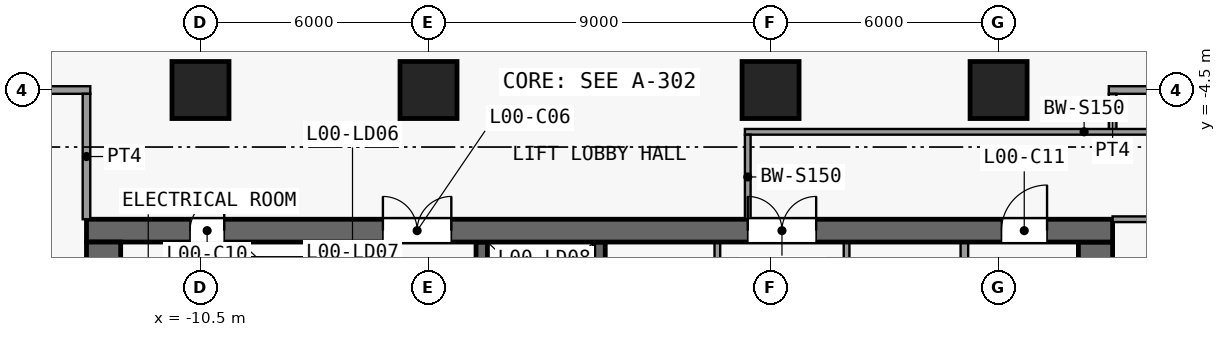
"""IFC4 building model, lengths in metres.
Left out: names, types, materials, properties, quantities, classifications, styles, units other than length and angle.
Written with IfcOpenShell. Run it as: python <this file> out.ifc"""

import sys

from ifc_helpers import new_model, si_unit, direction, frame, frame_2d, origin, origin_2d, place, context, subcontext, project, spatial, rectangle, extrude, element, fill, save


model = new_model("IFC4")
c1 = context("Model", 3, precision=1e-05, world=origin(), true_north=direction((0.0, 1.0)))
c2 = subcontext(c1, "Body", "Model", "MODEL_VIEW")
j1 = project(units=[si_unit("LENGTHUNIT", "METRE"), si_unit("PLANEANGLEUNIT", "RADIAN")], contexts=[c1])
p1 = place(None, origin())
s1 = spatial("IfcSite", under=j1, at=p1, CompositionType="ELEMENT")
p2 = place(p1, origin())
s2 = spatial("IfcBuilding", under=s1, at=p2, CompositionType="ELEMENT")
p3 = place(p2, origin())
s3 = spatial("IfcBuildingStorey", under=s2, at=p3, CompositionType="ELEMENT", Elevation=0.0)
for number, where, z_axis, x_axis in (
    (1, (-10.5, -4.5, 0.0), (0.0, 0.0, 1.0), (1.0, 0.0, 0.0)),
    (2, (-4.5, -4.5, 0.0), (0.0, 0.0, 1.0), (1.0, 0.0, 0.0)),
    (3, (4.5, -4.5, 0.0), (0.0, 0.0, 1.0), (1.0, 0.0, 0.0)),
    (4, (10.5, -4.5, 0.0), (0.0, 0.0, 1.0), (1.0, 0.0, 0.0)),
):
    element("IfcColumn", number, at=place(p3, frame(where, z_axis=z_axis, x_axis=x_axis)), inside=s3, PredefinedType="COLUMN", context=c2, shape_type="SweptSolid", body=[
        extrude(rectangle(XDim=1.5, YDim=1.5, at=origin_2d()), origin(), (0.0, 0.0, 1.0), 8.0),
    ])
p4 = place(p3, frame((-13.5, -8.2, 0.0), z_axis=(0.0, 0.0, 1.0), x_axis=(1.0, 0.0, 0.0)))
e5 = element("IfcWall", 5, at=p4, inside=s3, PredefinedType="SHEAR", context=c2, shape_type="SweptSolid", body=[
    extrude(rectangle(XDim=27.0, YDim=0.6, at=frame_2d((13.5, 0.0))), origin(), (0.0, 0.0, 1.0), 7.65),
])
p5 = place(p4, frame((7.8, 0.0, 0.0)))
e6 = element("IfcOpeningElement", 6, at=p5, cuts=e5, PredefinedType="OPENING", context=c2, shape_type="SweptSolid", body=[
    extrude(rectangle(XDim=1.8, YDim=2.1, at=frame_2d((0.9, 1.05))), frame((0.0, 0.31, 0.0), z_axis=(0.0, -1.0, 0.0), x_axis=(1.0, 0.0, 0.0)), (0.0, 0.0, 1.0), 0.62),
])
p6 = place(p4, frame((17.4, 0.0, 0.0)))
e7 = element("IfcOpeningElement", 7, at=p6, cuts=e5, PredefinedType="OPENING", context=c2, shape_type="SweptSolid", body=[
    extrude(rectangle(XDim=1.8, YDim=2.1, at=frame_2d((0.9, 1.05))), frame((0.0, 0.31, 0.0), z_axis=(0.0, -1.0, 0.0), x_axis=(1.0, 0.0, 0.0)), (0.0, 0.0, 1.0), 0.62),
])
p7 = place(p4, frame((2.725, 0.0, 0.0)))
e8 = element("IfcOpeningElement", 8, at=p7, cuts=e5, PredefinedType="OPENING", context=c2, shape_type="SweptSolid", body=[
    extrude(rectangle(XDim=0.9, YDim=2.1, at=frame_2d((0.45, 1.05))), frame((0.0, 0.31, 0.0), z_axis=(0.0, -1.0, 0.0), x_axis=(1.0, 0.0, 0.0)), (0.0, 0.0, 1.0), 0.62),
])
p8 = place(p4, frame((24.075, 0.0, 0.0)))
e9 = element("IfcOpeningElement", 9, at=p8, cuts=e5, PredefinedType="OPENING", context=c2, shape_type="SweptSolid", body=[
    extrude(rectangle(XDim=1.2, YDim=2.1, at=frame_2d((0.6, 1.05))), frame((0.0, 0.31, 0.0), z_axis=(0.0, -1.0, 0.0), x_axis=(1.0, 0.0, 0.0)), (0.0, 0.0, 1.0), 0.62),
])
p9 = place(p3, frame((-13.05, -8.5, 0.0), z_axis=(0.0, 0.0, 1.0), x_axis=(0.0, -1.0, 0.0)))
e10 = element("IfcWall", 10, at=p9, inside=s3, PredefinedType="SHEAR", context=c2, shape_type="SweptSolid", body=[
    extrude(rectangle(XDim=16.1, YDim=0.9, at=frame_2d((8.05, 0.0))), origin(), (0.0, 0.0, 1.0), 7.65),
])
p10 = place(p9, frame((14.8, 0.0, 0.0)))
e11 = element("IfcOpeningElement", 11, at=p10, cuts=e10, PredefinedType="OPENING", context=c2, shape_type="SweptSolid", body=[
    extrude(rectangle(XDim=1.1, YDim=2.1, at=frame_2d((0.55, 1.05))), frame((0.0, 0.46, 0.0), z_axis=(0.0, -1.0, 0.0), x_axis=(1.0, 0.0, 0.0)), (0.0, 0.0, 1.0), 0.92),
])
p11 = place(p3, frame((13.05, -24.6, 0.0), z_axis=(0.0, 0.0, 1.0), x_axis=(0.0, 1.0, 0.0)))
e12 = element("IfcWall", 12, at=p11, inside=s3, PredefinedType="SHEAR", context=c2, shape_type="SweptSolid", body=[
    extrude(rectangle(XDim=16.1, YDim=0.9, at=frame_2d((8.05, 0.0))), origin(), (0.0, 0.0, 1.0), 7.65),
])
p12 = place(p3, frame((-11.05, -12.1, 0.0), z_axis=(0.0, 0.0, 1.0), x_axis=(0.0, 1.0, 0.0)))
e13 = element("IfcWall", 13, at=p12, inside=s3, PredefinedType="PARTITIONING", context=c2, shape_type="SweptSolid", body=[
    extrude(rectangle(XDim=3.6, YDim=0.2, at=frame_2d((1.8, 0.0))), origin(), (0.0, 0.0, 1.0), 7.65),
])
p13 = place(p12, frame((1.4, 0.0, 0.0)))
e14 = element("IfcOpeningElement", 14, at=p13, cuts=e13, PredefinedType="OPENING", context=c2, shape_type="SweptSolid", body=[
    extrude(rectangle(XDim=0.9, YDim=2.1, at=frame_2d((0.45, 1.05))), frame((0.0, 0.11, 0.0), z_axis=(0.0, -1.0, 0.0), x_axis=(1.0, 0.0, 0.0)), (0.0, 0.0, 1.0), 0.22),
])
p14 = place(p3, frame((-9.6, -17.2, 0.0), z_axis=(0.0, 0.0, 1.0), x_axis=(0.0, 1.0, 0.0)))
e15 = element("IfcWall", 15, at=p14, inside=s3, PredefinedType="SHEAR", context=c2, shape_type="SweptSolid", body=[
    extrude(rectangle(XDim=8.7, YDim=0.3, at=frame_2d((4.35, 0.0))), origin(), (0.0, 0.0, 1.0), 7.65),
])
p15 = place(p3, frame((-6.5, -22.5, 0.0), z_axis=(0.0, 0.0, 1.0), x_axis=(0.0, 1.0, 0.0)))
e16 = element("IfcWall", 16, at=p15, inside=s3, PredefinedType="SHEAR", context=c2, shape_type="SweptSolid", body=[
    extrude(rectangle(XDim=14.0, YDim=0.3, at=frame_2d((7.0, 0.0))), origin(), (0.0, 0.0, 1.0), 7.65),
])
p16 = place(p15, frame((0.94, 0.0, 0.0)))
e17 = element("IfcOpeningElement", 17, at=p16, cuts=e16, PredefinedType="OPENING", context=c2, shape_type="SweptSolid", body=[
    extrude(rectangle(XDim=1.1, YDim=2.1, at=frame_2d((0.55, 1.05))), frame((0.0, 0.16, 0.0), z_axis=(0.0, -1.0, 0.0), x_axis=(1.0, 0.0, 0.0)), (0.0, 0.0, 1.0), 0.32),
])
p17 = place(p15, frame((3.72, 0.0, 0.0)))
e18 = element("IfcOpeningElement", 18, at=p17, cuts=e16, PredefinedType="OPENING", context=c2, shape_type="SweptSolid", body=[
    extrude(rectangle(XDim=1.1, YDim=2.1, at=frame_2d((0.55, 1.05))), frame((0.0, 0.16, 0.0), z_axis=(0.0, -1.0, 0.0), x_axis=(1.0, 0.0, 0.0)), (0.0, 0.0, 1.0), 0.32),
])
p18 = place(p15, frame((6.5, 0.0, 0.0)))
e19 = element("IfcOpeningElement", 19, at=p18, cuts=e16, PredefinedType="OPENING", context=c2, shape_type="SweptSolid", body=[
    extrude(rectangle(XDim=1.1, YDim=2.1, at=frame_2d((0.55, 1.05))), frame((0.0, 0.16, 0.0), z_axis=(0.0, -1.0, 0.0), x_axis=(1.0, 0.0, 0.0)), (0.0, 0.0, 1.0), 0.32),
])
p19 = place(p15, frame((9.28, 0.0, 0.0)))
e20 = element("IfcOpeningElement", 20, at=p19, cuts=e16, PredefinedType="OPENING", context=c2, shape_type="SweptSolid", body=[
    extrude(rectangle(XDim=1.1, YDim=2.1, at=frame_2d((0.55, 1.05))), frame((0.0, 0.16, 0.0), z_axis=(0.0, -1.0, 0.0), x_axis=(1.0, 0.0, 0.0)), (0.0, 0.0, 1.0), 0.32),
])
p20 = place(p15, frame((12.06, 0.0, 0.0)))
e21 = element("IfcOpeningElement", 21, at=p20, cuts=e16, PredefinedType="OPENING", context=c2, shape_type="SweptSolid", body=[
    extrude(rectangle(XDim=1.1, YDim=2.1, at=frame_2d((0.55, 1.05))), frame((0.0, 0.16, 0.0), z_axis=(0.0, -1.0, 0.0), x_axis=(1.0, 0.0, 0.0)), (0.0, 0.0, 1.0), 0.32),
])
p21 = place(p3, frame((-3.1, -22.55, 0.0), z_axis=(0.0, 0.0, 1.0), x_axis=(0.0, 1.0, 0.0)))
e22 = element("IfcWall", 22, at=p21, inside=s3, PredefinedType="SHEAR", context=c2, shape_type="SweptSolid", body=[
    extrude(rectangle(XDim=14.05, YDim=0.3, at=frame_2d((7.025, 0.0))), origin(), (0.0, 0.0, 1.0), 7.65),
])
p22 = place(p21, frame((12.11, 0.0, 0.0)))
e23 = element("IfcOpeningElement", 23, at=p22, cuts=e22, PredefinedType="OPENING", context=c2, shape_type="SweptSolid", body=[
    extrude(rectangle(XDim=1.1, YDim=2.1, at=frame_2d((0.55, 1.05))), frame((0.0, 0.16, 0.0), z_axis=(0.0, -1.0, 0.0), x_axis=(1.0, 0.0, 0.0)), (0.0, 0.0, 1.0), 0.32),
])
p23 = place(p21, frame((3.77, 0.0, 0.0)))
e24 = element("IfcOpeningElement", 24, at=p23, cuts=e22, PredefinedType="OPENING", context=c2, shape_type="SweptSolid", body=[
    extrude(rectangle(XDim=1.1, YDim=2.1, at=frame_2d((0.55, 1.05))), frame((0.0, 0.16, 0.0), z_axis=(0.0, -1.0, 0.0), x_axis=(1.0, 0.0, 0.0)), (0.0, 0.0, 1.0), 0.32),
])
p24 = place(p21, frame((6.55, 0.0, 0.0)))
e25 = element("IfcOpeningElement", 25, at=p24, cuts=e22, PredefinedType="OPENING", context=c2, shape_type="SweptSolid", body=[
    extrude(rectangle(XDim=1.1, YDim=2.1, at=frame_2d((0.55, 1.05))), frame((0.0, 0.16, 0.0), z_axis=(0.0, -1.0, 0.0), x_axis=(1.0, 0.0, 0.0)), (0.0, 0.0, 1.0), 0.32),
])
p25 = place(p21, frame((9.33, 0.0, 0.0)))
e26 = element("IfcOpeningElement", 26, at=p25, cuts=e22, PredefinedType="OPENING", context=c2, shape_type="SweptSolid", body=[
    extrude(rectangle(XDim=1.1, YDim=2.1, at=frame_2d((0.55, 1.05))), frame((0.0, 0.16, 0.0), z_axis=(0.0, -1.0, 0.0), x_axis=(1.0, 0.0, 0.0)), (0.0, 0.0, 1.0), 0.32),
])
p26 = place(p21, frame((0.84, 0.0, 0.0)))
e27 = element("IfcOpeningElement", 27, at=p26, cuts=e22, PredefinedType="OPENING", context=c2, shape_type="SweptSolid", body=[
    extrude(rectangle(XDim=1.4, YDim=2.1, at=frame_2d((0.7, 1.05))), frame((0.0, 0.16, 0.0), z_axis=(0.0, -1.0, 0.0), x_axis=(1.0, 0.0, 0.0)), (0.0, 0.0, 1.0), 0.32),
])
p27 = place(p3, frame((0.0, -22.25, 0.0), z_axis=(0.0, 0.0, 1.0), x_axis=(0.0, 1.0, 0.0)))
e28 = element("IfcWall", 28, at=p27, inside=s3, PredefinedType="SHEAR", context=c2, shape_type="SweptSolid", body=[
    extrude(rectangle(XDim=13.75, YDim=0.3, at=frame_2d((6.875, 0.0))), origin(), (0.0, 0.0, 1.0), 7.65),
])
p28 = place(p3, frame((3.1, -19.4, 0.0), z_axis=(0.0, 0.0, 1.0), x_axis=(0.0, 1.0, 0.0)))
e29 = element("IfcWall", 29, at=p28, inside=s3, PredefinedType="PARTITIONING", context=c2, shape_type="SweptSolid", body=[
    extrude(rectangle(XDim=10.9, YDim=0.15, at=frame_2d((5.45, 0.0))), origin(), (0.0, 0.0, 1.0), 7.65),
])
p29 = place(p28, frame((0.825, 0.0, 0.0)))
e30 = element("IfcOpeningElement", 30, at=p29, cuts=e29, PredefinedType="OPENING", context=c2, shape_type="SweptSolid", body=[
    extrude(rectangle(XDim=0.9, YDim=2.1, at=frame_2d((0.45, 1.05))), frame((0.0, 0.085, 0.0), z_axis=(0.0, -1.0, 0.0), x_axis=(1.0, 0.0, 0.0)), (0.0, 0.0, 1.0), 0.17),
])
p30 = place(p28, frame((6.175, 0.0, 0.0)))
e31 = element("IfcOpeningElement", 31, at=p30, cuts=e29, PredefinedType="OPENING", context=c2, shape_type="SweptSolid", body=[
    extrude(rectangle(XDim=1.2, YDim=2.1, at=frame_2d((0.6, 1.05))), frame((0.0, 0.085, 0.0), z_axis=(0.0, -1.0, 0.0), x_axis=(1.0, 0.0, 0.0)), (0.0, 0.0, 1.0), 0.17),
])
p31 = place(p3, frame((6.5, -8.5, 0.0), z_axis=(0.0, 0.0, 1.0), x_axis=(0.0, -1.0, 0.0)))
e32 = element("IfcWall", 32, at=p31, inside=s3, PredefinedType="PARTITIONING", context=c2, shape_type="SweptSolid", body=[
    extrude(rectangle(XDim=10.85, YDim=0.15, at=frame_2d((5.425, 0.0))), origin(), (0.0, 0.0, 1.0), 7.65),
])
p32 = place(p31, frame((7.65, 0.0, 0.0)))
e33 = element("IfcOpeningElement", 33, at=p32, cuts=e32, PredefinedType="OPENING", context=c2, shape_type="SweptSolid", body=[
    extrude(rectangle(XDim=1.2, YDim=2.1, at=frame_2d((0.6, 1.05))), frame((0.0, 0.085, 0.0), z_axis=(0.0, -1.0, 0.0), x_axis=(1.0, 0.0, 0.0)), (0.0, 0.0, 1.0), 0.17),
])
p33 = place(p31, frame((2.15, 0.0, 0.0)))
e34 = element("IfcOpeningElement", 34, at=p33, cuts=e32, PredefinedType="OPENING", context=c2, shape_type="SweptSolid", body=[
    extrude(rectangle(XDim=1.2, YDim=2.1, at=frame_2d((0.6, 1.05))), frame((0.0, 0.085, 0.0), z_axis=(0.0, -1.0, 0.0), x_axis=(1.0, 0.0, 0.0)), (0.0, 0.0, 1.0), 0.17),
])
p34 = place(p3, frame((9.6, -16.9, 0.0), z_axis=(0.0, 0.0, 1.0), x_axis=(0.0, 1.0, 0.0)))
e35 = element("IfcWall", 35, at=p34, inside=s3, PredefinedType="PARTITIONING", context=c2, shape_type="SweptSolid", body=[
    extrude(rectangle(XDim=8.4, YDim=0.2, at=frame_2d((4.2, 0.0))), origin(), (0.0, 0.0, 1.0), 7.65),
])
p35 = place(p3, frame((13.5, -7.9, 0.0), z_axis=(0.0, 0.0, 1.0), x_axis=(1.0, 0.0, 0.0)))
e36 = element("IfcWall", 36, at=p35, inside=s3, PredefinedType="PARTITIONING", context=c2, shape_type="SweptSolid", body=[
    extrude(rectangle(XDim=4.875, YDim=0.15, at=frame_2d((2.438, 0.0))), origin(), (0.0, 0.0, 1.0), 7.65),
])
p36 = place(p3, frame((3.825, -5.6, 0.0), z_axis=(0.0, 0.0, 1.0), x_axis=(1.0, 0.0, 0.0)))
e37 = element("IfcWall", 37, at=p36, inside=s3, PredefinedType="PARTITIONING", context=c2, shape_type="SweptSolid", body=[
    extrude(rectangle(XDim=17.85, YDim=0.15, at=frame_2d((8.925, 0.0))), origin(), (0.0, 0.0, 1.0), 7.65),
])
p37 = place(p3, frame((3.9, -7.9, 0.0), z_axis=(0.0, 0.0, 1.0), x_axis=(0.0, 1.0, 0.0)))
e38 = element("IfcWall", 38, at=p37, inside=s3, PredefinedType="PARTITIONING", context=c2, shape_type="SweptSolid", body=[
    extrude(rectangle(XDim=2.225, YDim=0.15, at=frame_2d((1.112, 0.0))), origin(), (0.0, 0.0, 1.0), 7.65),
])
p38 = place(p3, frame((-31.6, -4.5, 0.0), z_axis=(0.0, 0.0, 1.0), x_axis=(1.0, 0.0, 0.0)))
e39 = element("IfcWall", 39, at=p38, inside=s3, PredefinedType="PARTITIONING", context=c2, shape_type="SweptSolid", body=[
    extrude(rectangle(XDim=18.2, YDim=0.2, at=frame_2d((9.1, 0.0))), origin(), (0.0, 0.0, 1.0), 7.65),
])
p39 = place(p38, frame((3.2, 0.0, 0.0)))
e40 = element("IfcOpeningElement", 40, at=p39, cuts=e39, PredefinedType="OPENING", context=c2, shape_type="SweptSolid", body=[
    extrude(rectangle(XDim=1.0, YDim=2.1, at=frame_2d((0.5, 1.05))), frame((0.0, 0.11, 0.0), z_axis=(0.0, -1.0, 0.0), x_axis=(1.0, 0.0, 0.0)), (0.0, 0.0, 1.0), 0.22),
])
p40 = place(p38, frame((13.2, 0.0, 0.0)))
e41 = element("IfcOpeningElement", 41, at=p40, cuts=e39, PredefinedType="OPENING", context=c2, shape_type="SweptSolid", body=[
    extrude(rectangle(XDim=1.0, YDim=2.1, at=frame_2d((0.5, 1.05))), frame((0.0, 0.11, 0.0), z_axis=(0.0, -1.0, 0.0), x_axis=(1.0, 0.0, 0.0)), (0.0, 0.0, 1.0), 0.22),
])
p41 = place(p3, frame((13.4, -4.5, 0.0), z_axis=(0.0, 0.0, 1.0), x_axis=(1.0, 0.0, 0.0)))
e42 = element("IfcWall", 42, at=p41, inside=s3, PredefinedType="PARTITIONING", context=c2, shape_type="SweptSolid", body=[
    extrude(rectangle(XDim=15.1, YDim=0.2, at=frame_2d((7.55, 0.0))), origin(), (0.0, 0.0, 1.0), 7.65),
])
p42 = place(p41, frame((4.0, 0.0, 0.0)))
e43 = element("IfcOpeningElement", 43, at=p42, cuts=e42, PredefinedType="OPENING", context=c2, shape_type="SweptSolid", body=[
    extrude(rectangle(XDim=1.0, YDim=2.1, at=frame_2d((0.5, 1.05))), frame((0.0, 0.11, 0.0), z_axis=(0.0, -1.0, 0.0), x_axis=(1.0, 0.0, 0.0)), (0.0, 0.0, 1.0), 0.22),
])
p43 = place(p41, frame((11.6, 0.0, 0.0)))
e44 = element("IfcOpeningElement", 44, at=p43, cuts=e42, PredefinedType="OPENING", context=c2, shape_type="SweptSolid", body=[
    extrude(rectangle(XDim=1.0, YDim=2.1, at=frame_2d((0.5, 1.05))), frame((0.0, 0.11, 0.0), z_axis=(0.0, -1.0, 0.0), x_axis=(1.0, 0.0, 0.0)), (0.0, 0.0, 1.0), 0.22),
])
p44 = place(p3, frame((-13.5, -7.9, 0.0), z_axis=(0.0, 0.0, 1.0), x_axis=(0.0, 1.0, 0.0)))
e45 = element("IfcWall", 45, at=p44, inside=s3, PredefinedType="PARTITIONING", context=c2, shape_type="SweptSolid", body=[
    extrude(rectangle(XDim=3.3, YDim=0.2, at=frame_2d((1.65, 0.0))), origin(), (0.0, 0.0, 1.0), 7.65),
])
p45 = place(p3, frame((13.5, -5.6, 0.0), z_axis=(0.0, 0.0, 1.0), x_axis=(0.0, 1.0, 0.0)))
e46 = element("IfcWall", 46, at=p45, inside=s3, PredefinedType="PARTITIONING", context=c2, shape_type="SweptSolid", body=[
    extrude(rectangle(XDim=1.0, YDim=0.2, at=frame_2d((0.5, 0.0))), origin(), (0.0, 0.0, 1.0), 7.65),
])
p46 = place(p5, origin())
e47 = element("IfcDoor", 47, at=p46, inside=s3, OperationType="DOUBLE_DOOR_SINGLE_SWING", PredefinedType="DOOR", context=c2, shape_type="SweptSolid", body=[
    extrude(rectangle(XDim=1.8, YDim=2.1, at=frame_2d((0.9, 1.05))), frame((0.0, 0.025, 0.0), z_axis=(0.0, -1.0, 0.0), x_axis=(1.0, 0.0, 0.0)), (0.0, 0.0, 1.0), 0.05),
])
fill(e6, e47)
p47 = place(p6, origin())
e48 = element("IfcDoor", 48, at=p47, inside=s3, OperationType="DOUBLE_DOOR_SINGLE_SWING", PredefinedType="DOOR", context=c2, shape_type="SweptSolid", body=[
    extrude(rectangle(XDim=1.8, YDim=2.1, at=frame_2d((0.9, 1.05))), frame((0.0, 0.025, 0.0), z_axis=(0.0, -1.0, 0.0), x_axis=(1.0, 0.0, 0.0)), (0.0, 0.0, 1.0), 0.05),
])
fill(e7, e48)
p48 = place(p7, origin())
e49 = element("IfcDoor", 49, at=p48, inside=s3, OperationType="SINGLE_SWING_RIGHT", PredefinedType="DOOR", context=c2, shape_type="SweptSolid", body=[
    extrude(rectangle(XDim=0.9, YDim=2.1, at=frame_2d((0.45, 1.05))), frame((0.0, 0.025, 0.0), z_axis=(0.0, -1.0, 0.0), x_axis=(1.0, 0.0, 0.0)), (0.0, 0.0, 1.0), 0.05),
])
fill(e8, e49)
p49 = place(p8, origin())
e50 = element("IfcDoor", 50, at=p49, inside=s3, OperationType="SINGLE_SWING_RIGHT", PredefinedType="DOOR", context=c2, shape_type="SweptSolid", body=[
    extrude(rectangle(XDim=1.2, YDim=2.1, at=frame_2d((0.6, 1.05))), frame((0.0, 0.025, 0.0), z_axis=(0.0, -1.0, 0.0), x_axis=(1.0, 0.0, 0.0)), (0.0, 0.0, 1.0), 0.05),
])
fill(e9, e50)
save(model, sys.argv[1])
